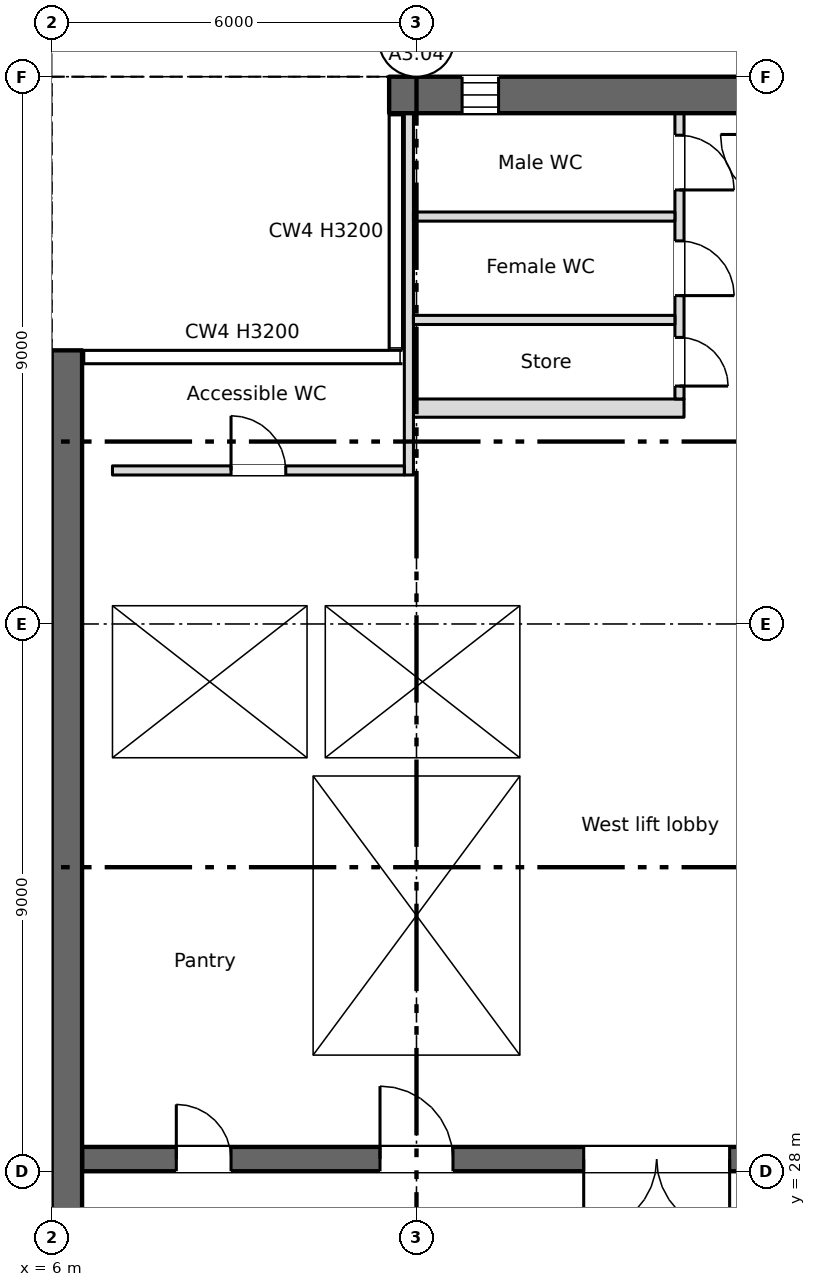
"""IFC4 building model, lengths in metres.
Left out: names, types, materials, properties, quantities, classifications, styles, units other than length and angle.
Written with IfcOpenShell. Run it as: python <this file> out.ifc"""

import sys

from ifc_helpers import new_model, si_unit, direction, frame, frame_2d, origin, place, context, subcontext, project, spatial, rectangle, extrude, element, fill, save


model = new_model("IFC4")
c1 = context("Model", 3, precision=1e-05, world=origin(), true_north=direction((0.0, 1.0)))
c2 = subcontext(c1, "Body", "Model", "MODEL_VIEW")
j1 = project(units=[si_unit("LENGTHUNIT", "METRE"), si_unit("PLANEANGLEUNIT", "RADIAN")], contexts=[c1])
p1 = place(None, origin())
s1 = spatial("IfcSite", under=j1, at=p1, CompositionType="ELEMENT")
p2 = place(p1, origin())
s2 = spatial("IfcBuilding", under=s1, at=p2, CompositionType="ELEMENT")
p3 = place(p2, frame((0.0, 0.0, 262.15)))
s3 = spatial("IfcBuildingStorey", under=s2, at=p3, CompositionType="ELEMENT", Elevation=262.15)
p4 = place(p3, frame((6.25, 8.5, 0.0), z_axis=(0.0, 0.0, 1.0), x_axis=(0.0, 1.0, 0.0)))
e1 = element("IfcWall", 1, at=p4, inside=s3, PredefinedType="SHEAR", context=c2, shape_type="SweptSolid", body=[
    extrude(rectangle(XDim=33.0, YDim=0.5, at=frame_2d((16.5, 0.0))), origin(), (0.0, 0.0, 1.0), 3.2),
])
p5 = place(p4, frame((1.2, 0.0, 0.6)))
e2 = element("IfcOpeningElement", 2, at=p5, cuts=e1, PredefinedType="OPENING", context=c2, shape_type="SweptSolid", body=[
    extrude(rectangle(XDim=0.6, YDim=2.4, at=frame_2d((0.3, 1.2))), frame((0.0, 0.26, 0.0), z_axis=(0.0, -1.0, 0.0), x_axis=(1.0, 0.0, 0.0)), (0.0, 0.0, 1.0), 0.52),
])
p6 = place(p4, frame((7.2, 0.0, 0.6)))
e3 = element("IfcOpeningElement", 3, at=p6, cuts=e1, PredefinedType="OPENING", context=c2, shape_type="SweptSolid", body=[
    extrude(rectangle(XDim=0.6, YDim=2.4, at=frame_2d((0.3, 1.2))), frame((0.0, 0.26, 0.0), z_axis=(0.0, -1.0, 0.0), x_axis=(1.0, 0.0, 0.0)), (0.0, 0.0, 1.0), 0.52),
])
p7 = place(p4, frame((13.2, 0.0, 0.6)))
e4 = element("IfcOpeningElement", 4, at=p7, cuts=e1, PredefinedType="OPENING", context=c2, shape_type="SweptSolid", body=[
    extrude(rectangle(XDim=0.6, YDim=2.4, at=frame_2d((0.3, 1.2))), frame((0.0, 0.26, 0.0), z_axis=(0.0, -1.0, 0.0), x_axis=(1.0, 0.0, 0.0)), (0.0, 0.0, 1.0), 0.52),
])
p8 = place(p3, frame((11.55, 45.7, 0.0), z_axis=(0.0, 0.0, 1.0), x_axis=(1.0, 0.0, 0.0)))
e5 = element("IfcWall", 5, at=p8, inside=s3, PredefinedType="SHEAR", context=c2, shape_type="SweptSolid", body=[
    extrude(rectangle(XDim=48.9, YDim=0.6, at=frame_2d((24.45, 0.0))), origin(), (0.0, 0.0, 1.0), 3.2),
])
p9 = place(p8, frame((1.2, 0.0, 0.6)))
e6 = element("IfcOpeningElement", 6, at=p9, cuts=e5, PredefinedType="OPENING", context=c2, shape_type="SweptSolid", body=[
    extrude(rectangle(XDim=0.6, YDim=2.4, at=frame_2d((0.3, 1.2))), frame((0.0, 0.31, 0.0), z_axis=(0.0, -1.0, 0.0), x_axis=(1.0, 0.0, 0.0)), (0.0, 0.0, 1.0), 0.62),
])
p10 = place(p3, frame((6.5, 28.2, 0.0), z_axis=(0.0, 0.0, 1.0), x_axis=(1.0, 0.0, 0.0)))
e7 = element("IfcWall", 7, at=p10, inside=s3, PredefinedType="SHEAR", context=c2, shape_type="SweptSolid", body=[
    extrude(rectangle(XDim=58.0, YDim=0.4, at=frame_2d((29.0, 0.0))), origin(), (0.0, 0.0, 1.0), 3.2),
])
p11 = place(p10, frame((12.262, 0.0, 0.0)))
e8 = element("IfcOpeningElement", 8, at=p11, cuts=e7, PredefinedType="OPENING", context=c2, shape_type="SweptSolid", body=[
    extrude(rectangle(XDim=0.9, YDim=2.1, at=frame_2d((0.45, 1.05))), frame((0.0, 0.21, 0.0), z_axis=(0.0, -1.0, 0.0), x_axis=(1.0, 0.0, 0.0)), (0.0, 0.0, 1.0), 0.42),
])
p12 = place(p10, frame((14.837, 0.0, 0.0)))
e9 = element("IfcOpeningElement", 9, at=p12, cuts=e7, PredefinedType="OPENING", context=c2, shape_type="SweptSolid", body=[
    extrude(rectangle(XDim=0.9, YDim=2.1, at=frame_2d((0.45, 1.05))), frame((0.0, 0.21, 0.0), z_axis=(0.0, -1.0, 0.0), x_axis=(1.0, 0.0, 0.0)), (0.0, 0.0, 1.0), 0.42),
])
p13 = place(p10, frame((49.262, 0.0, 0.0)))
e10 = element("IfcOpeningElement", 10, at=p13, cuts=e7, PredefinedType="OPENING", context=c2, shape_type="SweptSolid", body=[
    extrude(rectangle(XDim=0.9, YDim=2.1, at=frame_2d((0.45, 1.05))), frame((0.0, 0.21, 0.0), z_axis=(0.0, -1.0, 0.0), x_axis=(1.0, 0.0, 0.0)), (0.0, 0.0, 1.0), 0.42),
])
p14 = place(p10, frame((51.837, 0.0, 0.0)))
e11 = element("IfcOpeningElement", 11, at=p14, cuts=e7, PredefinedType="OPENING", context=c2, shape_type="SweptSolid", body=[
    extrude(rectangle(XDim=0.9, YDim=2.1, at=frame_2d((0.45, 1.05))), frame((0.0, 0.21, 0.0), z_axis=(0.0, -1.0, 0.0), x_axis=(1.0, 0.0, 0.0)), (0.0, 0.0, 1.0), 0.42),
])
p15 = place(p10, frame((1.55, 0.0, 0.0)))
e12 = element("IfcOpeningElement", 12, at=p15, cuts=e7, PredefinedType="OPENING", context=c2, shape_type="SweptSolid", body=[
    extrude(rectangle(XDim=0.9, YDim=2.1, at=frame_2d((0.45, 1.05))), frame((0.0, 0.21, 0.0), z_axis=(0.0, -1.0, 0.0), x_axis=(1.0, 0.0, 0.0)), (0.0, 0.0, 1.0), 0.42),
])
p16 = place(p10, frame((4.9, 0.0, 0.0)))
e13 = element("IfcOpeningElement", 13, at=p16, cuts=e7, PredefinedType="OPENING", context=c2, shape_type="SweptSolid", body=[
    extrude(rectangle(XDim=1.2, YDim=2.1, at=frame_2d((0.6, 1.05))), frame((0.0, 0.21, 0.0), z_axis=(0.0, -1.0, 0.0), x_axis=(1.0, 0.0, 0.0)), (0.0, 0.0, 1.0), 0.42),
])
p17 = place(p10, frame((31.9, 0.0, 0.0)))
e14 = element("IfcOpeningElement", 14, at=p17, cuts=e7, PredefinedType="OPENING", context=c2, shape_type="SweptSolid", body=[
    extrude(rectangle(XDim=1.2, YDim=2.1, at=frame_2d((0.6, 1.05))), frame((0.0, 0.21, 0.0), z_axis=(0.0, -1.0, 0.0), x_axis=(1.0, 0.0, 0.0)), (0.0, 0.0, 1.0), 0.42),
])
p18 = place(p10, frame((55.4, 0.0, 0.0)))
e15 = element("IfcOpeningElement", 15, at=p18, cuts=e7, PredefinedType="OPENING", context=c2, shape_type="SweptSolid", body=[
    extrude(rectangle(XDim=1.2, YDim=2.1, at=frame_2d((0.6, 1.05))), frame((0.0, 0.21, 0.0), z_axis=(0.0, -1.0, 0.0), x_axis=(1.0, 0.0, 0.0)), (0.0, 0.0, 1.0), 0.42),
])
p19 = place(p10, frame((21.9, 0.0, 0.0)))
e16 = element("IfcOpeningElement", 16, at=p19, cuts=e7, PredefinedType="OPENING", context=c2, shape_type="SweptSolid", body=[
    extrude(rectangle(XDim=1.2, YDim=2.1, at=frame_2d((0.6, 1.05))), frame((0.0, 0.21, 0.0), z_axis=(0.0, -1.0, 0.0), x_axis=(1.0, 0.0, 0.0)), (0.0, 0.0, 1.0), 0.42),
])
p20 = place(p10, frame((41.9, 0.0, 0.0)))
e17 = element("IfcOpeningElement", 17, at=p20, cuts=e7, PredefinedType="OPENING", context=c2, shape_type="SweptSolid", body=[
    extrude(rectangle(XDim=1.2, YDim=2.1, at=frame_2d((0.6, 1.05))), frame((0.0, 0.21, 0.0), z_axis=(0.0, -1.0, 0.0), x_axis=(1.0, 0.0, 0.0)), (0.0, 0.0, 1.0), 0.42),
])
p21 = place(p10, frame((25.05, 0.0, 0.0)))
e18 = element("IfcOpeningElement", 18, at=p21, cuts=e7, PredefinedType="OPENING", context=c2, shape_type="SweptSolid", body=[
    extrude(rectangle(XDim=2.4, YDim=2.1, at=frame_2d((1.2, 1.05))), frame((0.0, 0.21, 0.0), z_axis=(0.0, -1.0, 0.0), x_axis=(1.0, 0.0, 0.0)), (0.0, 0.0, 1.0), 0.42),
])
p22 = place(p10, frame((37.55, 0.0, 0.0)))
e19 = element("IfcOpeningElement", 19, at=p22, cuts=e7, PredefinedType="OPENING", context=c2, shape_type="SweptSolid", body=[
    extrude(rectangle(XDim=2.4, YDim=2.1, at=frame_2d((1.2, 1.05))), frame((0.0, 0.21, 0.0), z_axis=(0.0, -1.0, 0.0), x_axis=(1.0, 0.0, 0.0)), (0.0, 0.0, 1.0), 0.42),
])
p23 = place(p10, frame((8.25, 0.0, 0.0)))
e20 = element("IfcOpeningElement", 20, at=p23, cuts=e7, PredefinedType="OPENING", context=c2, shape_type="SweptSolid", body=[
    extrude(rectangle(XDim=2.4, YDim=2.1, at=frame_2d((1.2, 1.05))), frame((0.0, 0.21, 0.0), z_axis=(0.0, -1.0, 0.0), x_axis=(1.0, 0.0, 0.0)), (0.0, 0.0, 1.0), 0.42),
])
p24 = place(p10, frame((29.05, 0.0, 0.0)))
e21 = element("IfcOpeningElement", 21, at=p24, cuts=e7, PredefinedType="OPENING", context=c2, shape_type="SweptSolid", body=[
    extrude(rectangle(XDim=0.9, YDim=2.1, at=frame_2d((0.45, 1.05))), frame((0.0, 0.21, 0.0), z_axis=(0.0, -1.0, 0.0), x_axis=(1.0, 0.0, 0.0)), (0.0, 0.0, 1.0), 0.42),
])
p25 = place(p10, frame((35.05, 0.0, 0.0)))
e22 = element("IfcOpeningElement", 22, at=p25, cuts=e7, PredefinedType="OPENING", context=c2, shape_type="SweptSolid", body=[
    extrude(rectangle(XDim=0.9, YDim=2.1, at=frame_2d((0.45, 1.05))), frame((0.0, 0.21, 0.0), z_axis=(0.0, -1.0, 0.0), x_axis=(1.0, 0.0, 0.0)), (0.0, 0.0, 1.0), 0.42),
])
p26 = place(p3, frame((6.75, 28.4, 0.0), z_axis=(0.0, 0.0, 1.0), x_axis=(0.0, 1.0, 0.0)))
e23 = element("IfcWall", 23, at=p26, inside=s3, PredefinedType="SHEAR", context=c2, shape_type="SweptSolid", body=[
    extrude(rectangle(XDim=12.85, YDim=0.5, at=frame_2d((6.425, 0.0))), origin(), (0.0, 0.0, 1.0), 3.2),
])
for number, where, z_axis, x_axis in (
    (24, (10.15, 28.4, 0.0), (0.0, 0.0, 1.0), (0.0, 1.0, 0.0)),
    (25, (13.85, 28.4, 0.0), (0.0, 0.0, 1.0), (0.0, 1.0, 0.0)),
):
    element("IfcWall", number, at=place(p3, frame(where, z_axis=z_axis, x_axis=x_axis)), inside=s3, PredefinedType="SHEAR", context=c2, shape_type="SweptSolid", body=[
        extrude(rectangle(XDim=6.1, YDim=0.3, at=frame_2d((3.05, 0.0))), origin(), (0.0, 0.0, 1.0), 3.2),
    ])
p27 = place(p3, frame((7.0, 34.65, 0.0), z_axis=(0.0, 0.0, 1.0), x_axis=(1.0, 0.0, 0.0)))
e26 = element("IfcWall", 26, at=p27, inside=s3, PredefinedType="SHEAR", context=c2, shape_type="SweptSolid", body=[
    extrude(rectangle(XDim=7.0, YDim=0.3, at=frame_2d((3.5, 0.0))), origin(), (0.0, 0.0, 1.0), 3.2),
])
p28 = place(p3, frame((7.0, 37.45, 0.0), z_axis=(0.0, 0.0, 1.0), x_axis=(1.0, 0.0, 0.0)))
e27 = element("IfcWall", 27, at=p28, inside=s3, PredefinedType="SHEAR", context=c2, shape_type="SweptSolid", body=[
    extrude(rectangle(XDim=7.0, YDim=0.3, at=frame_2d((3.5, 0.0))), origin(), (0.0, 0.0, 1.0), 3.2),
])
p29 = place(p28, frame((1.05, 0.0, 0.0)))
e28 = element("IfcOpeningElement", 28, at=p29, cuts=e27, PredefinedType="OPENING", context=c2, shape_type="SweptSolid", body=[
    extrude(rectangle(XDim=1.1, YDim=2.1, at=frame_2d((0.55, 1.05))), frame((0.0, 0.16, 0.0), z_axis=(0.0, -1.0, 0.0), x_axis=(1.0, 0.0, 0.0)), (0.0, 0.0, 1.0), 0.32),
])
p30 = place(p28, frame((4.55, 0.0, 0.0)))
e29 = element("IfcOpeningElement", 29, at=p30, cuts=e27, PredefinedType="OPENING", context=c2, shape_type="SweptSolid", body=[
    extrude(rectangle(XDim=1.1, YDim=2.1, at=frame_2d((0.55, 1.05))), frame((0.0, 0.16, 0.0), z_axis=(0.0, -1.0, 0.0), x_axis=(1.0, 0.0, 0.0)), (0.0, 0.0, 1.0), 0.32),
])
p31 = place(p3, frame((13.85, 34.8, 0.0), z_axis=(0.0, 0.0, 1.0), x_axis=(0.0, 1.0, 0.0)))
e30 = element("IfcWall", 30, at=p31, inside=s3, PredefinedType="SHEAR", context=c2, shape_type="SweptSolid", body=[
    extrude(rectangle(XDim=2.5, YDim=0.3, at=frame_2d((1.25, 0.0))), origin(), (0.0, 0.0, 1.0), 3.2),
])
p32 = place(p3, frame((11.95, 40.55, 0.0), z_axis=(0.0, 0.0, 1.0), x_axis=(1.0, 0.0, 0.0)))
e31 = element("IfcWall", 31, at=p32, inside=s3, PredefinedType="PARTITIONING", context=c2, shape_type="SweptSolid", body=[
    extrude(rectangle(XDim=4.45, YDim=0.3, at=frame_2d((2.225, 0.0))), origin(), (0.0, 0.0, 1.0), 3.2),
])
p33 = place(p3, frame((10.35, 34.8, 0.0), z_axis=(0.0, 0.0, 1.0), x_axis=(0.0, 1.0, 0.0)))
e32 = element("IfcWall", 32, at=p33, inside=s3, PredefinedType="SHEAR", context=c2, shape_type="SweptSolid", body=[
    extrude(rectangle(XDim=2.5, YDim=0.3, at=frame_2d((1.25, 0.0))), origin(), (0.0, 0.0, 1.0), 3.2),
])
p34 = place(p3, frame((16.325, 45.4, 0.0), z_axis=(0.0, 0.0, 1.0), x_axis=(0.0, -1.0, 0.0)))
e33 = element("IfcWall", 33, at=p34, inside=s3, PredefinedType="PARTITIONING", context=c2, shape_type="SweptSolid", body=[
    extrude(rectangle(XDim=4.7, YDim=0.15, at=frame_2d((2.35, 0.0))), origin(), (0.0, 0.0, 1.0), 3.2),
])
p35 = place(p34, frame((3.688, 0.0, 0.0)))
e34 = element("IfcOpeningElement", 34, at=p35, cuts=e33, PredefinedType="OPENING", context=c2, shape_type="SweptSolid", body=[
    extrude(rectangle(XDim=0.8, YDim=2.1, at=frame_2d((0.4, 1.05))), frame((0.0, 0.085, 0.0), z_axis=(0.0, -1.0, 0.0), x_axis=(1.0, 0.0, 0.0)), (0.0, 0.0, 1.0), 0.17),
])
p36 = place(p34, frame((2.1, 0.0, 0.0)))
e35 = element("IfcOpeningElement", 35, at=p36, cuts=e33, PredefinedType="OPENING", context=c2, shape_type="SweptSolid", body=[
    extrude(rectangle(XDim=0.9, YDim=2.1, at=frame_2d((0.45, 1.05))), frame((0.0, 0.085, 0.0), z_axis=(0.0, -1.0, 0.0), x_axis=(1.0, 0.0, 0.0)), (0.0, 0.0, 1.0), 0.17),
])
p37 = place(p34, frame((0.363, 0.0, 0.0)))
e36 = element("IfcOpeningElement", 36, at=p37, cuts=e33, PredefinedType="OPENING", context=c2, shape_type="SweptSolid", body=[
    extrude(rectangle(XDim=0.9, YDim=2.1, at=frame_2d((0.45, 1.05))), frame((0.0, 0.085, 0.0), z_axis=(0.0, -1.0, 0.0), x_axis=(1.0, 0.0, 0.0)), (0.0, 0.0, 1.0), 0.17),
])
p38 = place(p3, frame((11.875, 39.45, 0.0), z_axis=(0.0, 0.0, 1.0), x_axis=(0.0, 1.0, 0.0)))
e37 = element("IfcWall", 37, at=p38, inside=s3, PredefinedType="PARTITIONING", context=c2, shape_type="SweptSolid", body=[
    extrude(rectangle(XDim=5.95, YDim=0.15, at=frame_2d((2.975, 0.0))), origin(), (0.0, 0.0, 1.0), 3.2),
])
p39 = place(p3, frame((7.0, 39.525, 0.0), z_axis=(0.0, 0.0, 1.0), x_axis=(1.0, 0.0, 0.0)))
e38 = element("IfcWall", 38, at=p39, inside=s3, PredefinedType="PARTITIONING", context=c2, shape_type="SweptSolid", body=[
    extrude(rectangle(XDim=4.8, YDim=0.15, at=frame_2d((2.4, 0.0))), origin(), (0.0, 0.0, 1.0), 3.2),
])
p40 = place(p39, frame((1.95, 0.0, 0.0)))
e39 = element("IfcOpeningElement", 39, at=p40, cuts=e38, PredefinedType="OPENING", context=c2, shape_type="SweptSolid", body=[
    extrude(rectangle(XDim=0.9, YDim=2.1, at=frame_2d((0.45, 1.05))), frame((0.0, 0.085, 0.0), z_axis=(0.0, -1.0, 0.0), x_axis=(1.0, 0.0, 0.0)), (0.0, 0.0, 1.0), 0.17),
])
for number, where, z_axis, x_axis in (
    (40, (11.95, 42.0, 0.0), (0.0, 0.0, 1.0), (1.0, 0.0, 0.0)),
    (41, (11.95, 43.7, 0.0), (0.0, 0.0, 1.0), (1.0, 0.0, 0.0)),
):
    element("IfcWall", number, at=place(p3, frame(where, z_axis=z_axis, x_axis=x_axis)), inside=s3, PredefinedType="PARTITIONING", context=c2, shape_type="SweptSolid", body=[
        extrude(rectangle(XDim=4.3, YDim=0.15, at=frame_2d((2.15, 0.0))), origin(), (0.0, 0.0, 1.0), 3.2),
    ])
p41 = place(p9, origin())
e42 = element("IfcWindow", 42, at=p41, inside=s3, PartitioningType="SINGLE_PANEL", PredefinedType="WINDOW", context=c2, shape_type="SweptSolid", body=[
    extrude(rectangle(XDim=0.6, YDim=2.4, at=frame_2d((0.3, 1.2))), frame((0.0, 0.03, 0.0), z_axis=(0.0, -1.0, 0.0), x_axis=(1.0, 0.0, 0.0)), (0.0, 0.0, 1.0), 0.06),
])
fill(e6, e42)
p42 = place(p15, origin())
e43 = element("IfcDoor", 43, at=p42, inside=s3, OperationType="SINGLE_SWING_LEFT", PredefinedType="DOOR", context=c2, shape_type="SweptSolid", body=[
    extrude(rectangle(XDim=0.9, YDim=2.1, at=frame_2d((0.45, 1.05))), frame((0.0, 0.025, 0.0), z_axis=(0.0, -1.0, 0.0), x_axis=(1.0, 0.0, 0.0)), (0.0, 0.0, 1.0), 0.05),
])
fill(e12, e43)
p43 = place(p40, origin())
e44 = element("IfcDoor", 44, at=p43, inside=s3, OperationType="SINGLE_SWING_LEFT", PredefinedType="DOOR", context=c2, shape_type="SweptSolid", body=[
    extrude(rectangle(XDim=0.9, YDim=2.1, at=frame_2d((0.45, 1.05))), frame((0.0, 0.025, 0.0), z_axis=(0.0, -1.0, 0.0), x_axis=(1.0, 0.0, 0.0)), (0.0, 0.0, 1.0), 0.05),
])
fill(e39, e44)
p44 = place(p35, origin())
e45 = element("IfcDoor", 45, at=p44, inside=s3, OperationType="SINGLE_SWING_RIGHT", PredefinedType="DOOR", context=c2, shape_type="SweptSolid", body=[
    extrude(rectangle(XDim=0.8, YDim=2.1, at=frame_2d((0.4, 1.05))), frame((0.0, 0.025, 0.0), z_axis=(0.0, -1.0, 0.0), x_axis=(1.0, 0.0, 0.0)), (0.0, 0.0, 1.0), 0.05),
])
fill(e34, e45)
p45 = place(p36, origin())
e46 = element("IfcDoor", 46, at=p45, inside=s3, OperationType="SINGLE_SWING_RIGHT", PredefinedType="DOOR", context=c2, shape_type="SweptSolid", body=[
    extrude(rectangle(XDim=0.9, YDim=2.1, at=frame_2d((0.45, 1.05))), frame((0.0, 0.025, 0.0), z_axis=(0.0, -1.0, 0.0), x_axis=(1.0, 0.0, 0.0)), (0.0, 0.0, 1.0), 0.05),
])
fill(e35, e46)
p46 = place(p37, origin())
e47 = element("IfcDoor", 47, at=p46, inside=s3, OperationType="SINGLE_SWING_RIGHT", PredefinedType="DOOR", context=c2, shape_type="SweptSolid", body=[
    extrude(rectangle(XDim=0.9, YDim=2.1, at=frame_2d((0.45, 1.05))), frame((0.0, 0.025, 0.0), z_axis=(0.0, -1.0, 0.0), x_axis=(1.0, 0.0, 0.0)), (0.0, 0.0, 1.0), 0.05),
])
fill(e36, e47)
p47 = place(p29, origin())
e48 = element("IfcDoor", 48, at=p47, inside=s3, OperationType="SLIDING_TO_LEFT", PredefinedType="DOOR", context=c2, shape_type="SweptSolid", body=[
    extrude(rectangle(XDim=1.1, YDim=2.1, at=frame_2d((0.55, 1.05))), frame((0.0, 0.025, 0.0), z_axis=(0.0, -1.0, 0.0), x_axis=(1.0, 0.0, 0.0)), (0.0, 0.0, 1.0), 0.05),
])
fill(e28, e48)
p48 = place(p30, origin())
e49 = element("IfcDoor", 49, at=p48, inside=s3, OperationType="SLIDING_TO_LEFT", PredefinedType="DOOR", context=c2, shape_type="SweptSolid", body=[
    extrude(rectangle(XDim=1.1, YDim=2.1, at=frame_2d((0.55, 1.05))), frame((0.0, 0.025, 0.0), z_axis=(0.0, -1.0, 0.0), x_axis=(1.0, 0.0, 0.0)), (0.0, 0.0, 1.0), 0.05),
])
fill(e29, e49)
p49 = place(p16, origin())
e50 = element("IfcDoor", 50, at=p49, inside=s3, OperationType="SINGLE_SWING_LEFT", PredefinedType="DOOR", context=c2, shape_type="SweptSolid", body=[
    extrude(rectangle(XDim=1.2, YDim=2.1, at=frame_2d((0.6, 1.05))), frame((0.0, 0.025, 0.0), z_axis=(0.0, -1.0, 0.0), x_axis=(1.0, 0.0, 0.0)), (0.0, 0.0, 1.0), 0.05),
])
fill(e13, e50)
p50 = place(p23, origin())
e51 = element("IfcDoor", 51, at=p50, inside=s3, OperationType="DOUBLE_DOOR_SINGLE_SWING", PredefinedType="DOOR", context=c2, shape_type="SweptSolid", body=[
    extrude(rectangle(XDim=2.4, YDim=2.1, at=frame_2d((1.2, 1.05))), frame((0.0, 0.025, 0.0), z_axis=(0.0, -1.0, 0.0), x_axis=(1.0, 0.0, 0.0)), (0.0, 0.0, 1.0), 0.05),
])
fill(e20, e51)
save(model, sys.argv[1])
